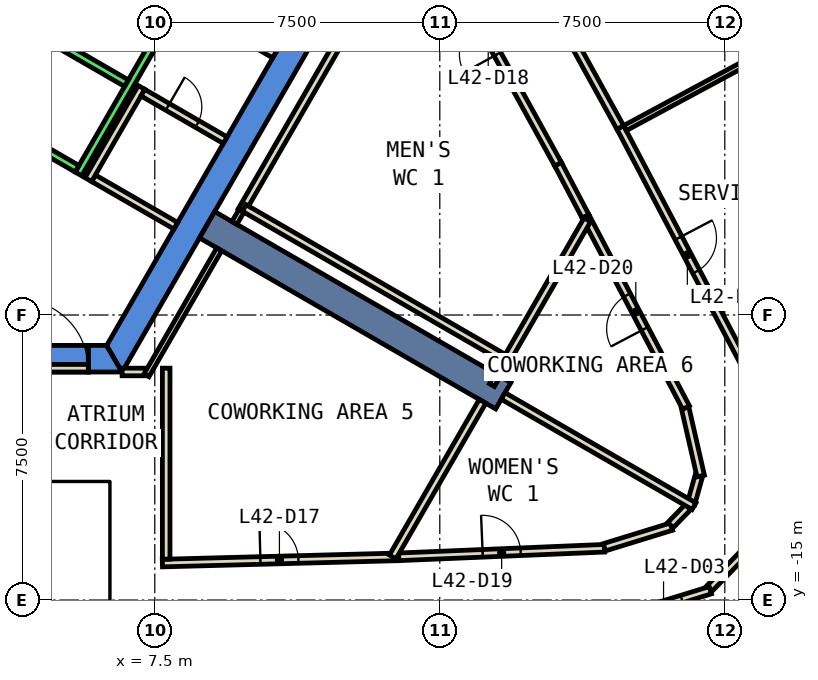
"""IFC4 building model, lengths in metres.
Left out: names, types, materials, properties, quantities, classifications, styles, units other than length and angle.
Written with IfcOpenShell. Run it as: python <this file> out.ifc"""

import sys

from ifc_helpers import new_model, si_unit, direction, frame, frame_2d, origin, place, context, subcontext, project, spatial, polyline, rectangle, outline, extrude, element, fill, save


model = new_model("IFC4")
c1 = context("Model", 3, precision=1e-05, world=origin(), true_north=direction((0.0, 1.0)))
c2 = subcontext(c1, "Body", "Model", "MODEL_VIEW")
j1 = project(units=[si_unit("LENGTHUNIT", "METRE"), si_unit("PLANEANGLEUNIT", "RADIAN")], contexts=[c1])
p1 = place(None, origin())
s1 = spatial("IfcSite", under=j1, at=p1, CompositionType="ELEMENT")
p2 = place(p1, origin())
s2 = spatial("IfcBuilding", under=s1, at=p2, CompositionType="ELEMENT")
p3 = place(p2, frame((0.0, 0.0, 189.8)))
s3 = spatial("IfcBuildingStorey", under=s2, at=p3, CompositionType="ELEMENT", Elevation=189.8)
p4 = place(p3, frame((0.0, 0.0, -0.6)))
e1 = element("IfcWall", 1, at=p4, inside=s3, PredefinedType="SHEAR", context=c2, shape_type="SweptSolid", body=[
    extrude(outline(polyline([(5.75, -8.3), (5.75, -9.0), (6.64, -9.0), (6.235, -8.3), (5.75, -8.3)])), origin(), (0.0, 0.0, 1.0), 4.4),
])
p5 = place(p3, frame((0.0, 0.0, 3.6)))
e2 = element("IfcWall", 2, at=p5, inside=s3, PredefinedType="SHEAR", context=c2, shape_type="SweptSolid", body=[
    extrude(outline(polyline([(5.75, -9.0), (5.75, -8.3), (3.75, -8.3), (3.75, -9.0), (5.75, -9.0)])), origin(), (0.0, 0.0, 1.0), 0.2),
])
p6 = place(p3, frame((0.0, 0.0, -0.6)))
e3 = element("IfcWall", 3, at=p6, inside=s3, PredefinedType="SHEAR", context=c2, shape_type="SweptSolid", body=[
    extrude(outline(polyline([(6.64, -9.0), (13.279, 2.5), (12.471, 2.5), (6.235, -8.3), (6.64, -9.0)])), origin(), (0.0, 0.0, 1.0), 4.4),
])
p7 = place(p3, frame((8.877, -5.125, -0.6), z_axis=(0.0, 0.0, 1.0), x_axis=(0.866017533419, -0.500013631625, 0.0)))
e4 = element("IfcWall", 4, at=p7, inside=s3, PredefinedType="SHEAR", context=c2, shape_type="SweptSolid", body=[
    extrude(rectangle(XDim=9.0, YDim=0.8, at=frame_2d((4.5, 0.0))), origin(), (0.0, 0.0, 1.0), 4.4),
])
p8 = place(p3, frame((7.7, -14.027, 0.0), z_axis=(0.0, 0.0, 1.0), x_axis=(0.999653919353, 0.026306682088, 0.0)))
e5 = element("IfcWall", 5, at=p8, inside=s3, PredefinedType="PARTITIONING", context=c2, shape_type="SweptSolid", body=[
    extrude(rectangle(XDim=6.162, YDim=0.2, at=frame_2d((3.081, 0.0))), origin(), (0.0, 0.0, 1.0), 3.8),
])
p9 = place(p8, frame((2.581, 0.0, 0.0)))
e6 = element("IfcOpeningElement", 6, at=p9, cuts=e5, PredefinedType="OPENING", context=c2, shape_type="SweptSolid", body=[
    extrude(rectangle(XDim=1.0, YDim=2.1, at=frame_2d((0.5, 1.05))), frame((0.0, 0.11, 0.0), z_axis=(0.0, -1.0, 0.0), x_axis=(1.0, 0.0, 0.0)), (0.0, 0.0, 1.0), 0.22),
])
p10 = place(p3, frame((18.836, -4.906, 0.0), z_axis=(0.0, 0.0, 1.0), x_axis=(-0.465843561357, 0.884867095299, 0.0)))
e7 = element("IfcWall", 7, at=p10, inside=s3, PredefinedType="PARTITIONING", context=c2, shape_type="SweptSolid", body=[
    extrude(rectangle(XDim=1.554, YDim=0.2, at=frame_2d((0.777, 0.0))), origin(), (0.0, 0.0, 1.0), 3.8),
])
p11 = place(p3, frame((18.112, -3.531, 0.0), z_axis=(0.0, 0.0, 1.0), x_axis=(-0.482800061144, 0.875730609811, 0.0)))
e8 = element("IfcWall", 8, at=p11, inside=s3, PredefinedType="PARTITIONING", context=c2, shape_type="SweptSolid", body=[
    extrude(rectangle(XDim=7.612, YDim=0.2, at=frame_2d((3.806, 0.0))), origin(), (0.0, 0.0, 1.0), 3.8),
])
p12 = place(p11, frame((3.306, 0.0, 0.0)))
e9 = element("IfcOpeningElement", 9, at=p12, cuts=e8, PredefinedType="OPENING", context=c2, shape_type="SweptSolid", body=[
    extrude(rectangle(XDim=1.0, YDim=2.1, at=frame_2d((0.5, 1.05))), frame((0.0, 0.11, 0.0), z_axis=(0.0, -1.0, 0.0), x_axis=(1.0, 0.0, 0.0)), (0.0, 0.0, 1.0), 0.22),
])
p13 = place(p3, frame((13.919, -13.863, 0.0), z_axis=(0.0, 0.0, 1.0), x_axis=(0.999130261307, 0.041697972867, 0.0)))
e10 = element("IfcWall", 10, at=p13, inside=s3, PredefinedType="PARTITIONING", context=c2, shape_type="SweptSolid", body=[
    extrude(rectangle(XDim=5.422, YDim=0.2, at=frame_2d((2.711, 0.0))), origin(), (0.0, 0.0, 1.0), 3.8),
])
p14 = place(p13, frame((2.211, 0.0, 0.0)))
e11 = element("IfcOpeningElement", 11, at=p14, cuts=e10, PredefinedType="OPENING", context=c2, shape_type="SweptSolid", body=[
    extrude(rectangle(XDim=1.0, YDim=2.1, at=frame_2d((0.5, 1.05))), frame((0.0, 0.11, 0.0), z_axis=(0.0, -1.0, 0.0), x_axis=(1.0, 0.0, 0.0)), (0.0, 0.0, 1.0), 0.22),
])
p15 = place(p3, frame((19.332, -13.611, 0.0), z_axis=(0.0, 0.0, 1.0), x_axis=(0.955790442908, 0.294048685161, 0.0)))
e12 = element("IfcWall", 12, at=p15, inside=s3, PredefinedType="PARTITIONING", context=c2, shape_type="SweptSolid", body=[
    extrude(rectangle(XDim=1.846, YDim=0.2, at=frame_2d((0.923, 0.0))), origin(), (0.0, 0.0, 1.0), 3.8),
])
p16 = place(p3, frame((21.072, -13.026, 0.0), z_axis=(0.0, 0.0, 1.0), x_axis=(0.697252405765, 0.716825698936, 0.0)))
e13 = element("IfcWall", 13, at=p16, inside=s3, PredefinedType="PARTITIONING", context=c2, shape_type="SweptSolid", body=[
    extrude(rectangle(XDim=0.661, YDim=0.2, at=frame_2d((0.331, 0.0))), origin(), (0.0, 0.0, 1.0), 3.8),
])
p17 = place(p3, frame((21.608, -12.476, 0.0), z_axis=(0.0, 0.0, 1.0), x_axis=(0.270277025631, 0.962782597171, 0.0)))
e14 = element("IfcWall", 14, at=p17, inside=s3, PredefinedType="PARTITIONING", context=c2, shape_type="SweptSolid", body=[
    extrude(rectangle(XDim=0.77, YDim=0.2, at=frame_2d((0.385, 0.0))), origin(), (0.0, 0.0, 1.0), 3.8),
])
p18 = place(p3, frame((21.866, -11.737, 0.0), z_axis=(0.0, 0.0, 1.0), x_axis=(-0.222871656966, 0.974847795567, 0.0)))
e15 = element("IfcWall", 15, at=p18, inside=s3, PredefinedType="PARTITIONING", context=c2, shape_type="SweptSolid", body=[
    extrude(rectangle(XDim=1.839, YDim=0.2, at=frame_2d((0.919, 0.0))), origin(), (0.0, 0.0, 1.0), 3.8),
])
p19 = place(p3, frame((21.48, -9.935, 0.0), z_axis=(0.0, 0.0, 1.0), x_axis=(-0.465356775138, 0.885123195851, 0.0)))
e16 = element("IfcWall", 16, at=p19, inside=s3, PredefinedType="PARTITIONING", context=c2, shape_type="SweptSolid", body=[
    extrude(rectangle(XDim=5.682, YDim=0.2, at=frame_2d((2.841, 0.0))), origin(), (0.0, 0.0, 1.0), 3.8),
])
p20 = place(p19, frame((2.341, 0.0, 0.0)))
e17 = element("IfcOpeningElement", 17, at=p20, cuts=e16, PredefinedType="OPENING", context=c2, shape_type="SweptSolid", body=[
    extrude(rectangle(XDim=1.0, YDim=2.1, at=frame_2d((0.5, 1.05))), frame((0.0, 0.11, 0.0), z_axis=(0.0, -1.0, 0.0), x_axis=(1.0, 0.0, 0.0)), (0.0, 0.0, 1.0), 0.22),
])
p21 = place(p3, frame((23.236, -13.528, 0.0), z_axis=(0.0, 0.0, 1.0), x_axis=(-0.698551276451, -0.715560000397, 0.0)))
e18 = element("IfcWall", 18, at=p21, inside=s3, PredefinedType="PARTITIONING", context=c2, shape_type="SweptSolid", body=[
    extrude(rectangle(XDim=1.636, YDim=0.2, at=frame_2d((0.818, 0.0))), origin(), (0.0, 0.0, 1.0), 3.8),
])
p22 = place(p3, frame((22.119, -14.741, 0.0), z_axis=(0.0, 0.0, 1.0), x_axis=(-0.955612889251, -0.294625195625, 0.0)))
e19 = element("IfcWall", 19, at=p22, inside=s3, PredefinedType="PARTITIONING", context=c2, shape_type="SweptSolid", body=[
    extrude(rectangle(XDim=2.576, YDim=0.2, at=frame_2d((1.288, 0.0))), origin(), (0.0, 0.0, 1.0), 3.8),
])
p23 = place(p22, frame((0.788, 0.0, 0.0)))
e20 = element("IfcOpeningElement", 20, at=p23, cuts=e19, PredefinedType="OPENING", context=c2, shape_type="SweptSolid", body=[
    extrude(rectangle(XDim=1.0, YDim=2.1, at=frame_2d((0.5, 1.05))), frame((0.0, 0.11, 0.0), z_axis=(0.0, -1.0, 0.0), x_axis=(1.0, 0.0, 0.0)), (0.0, 0.0, 1.0), 0.22),
])
p24 = place(p3, frame((19.75, -2.563, 0.0), z_axis=(0.0, 0.0, 1.0), x_axis=(0.465444987791, -0.885076812113, 0.0)))
e21 = element("IfcWall", 21, at=p24, inside=s3, PredefinedType="PARTITIONING", context=c2, shape_type="SweptSolid", body=[
    extrude(rectangle(XDim=7.578, YDim=0.2, at=frame_2d((3.789, 0.0))), origin(), (0.0, 0.0, 1.0), 3.8),
])
p25 = place(p24, frame((3.289, 0.0, 0.0)))
e22 = element("IfcOpeningElement", 22, at=p25, cuts=e21, PredefinedType="OPENING", context=c2, shape_type="SweptSolid", body=[
    extrude(rectangle(XDim=1.0, YDim=2.1, at=frame_2d((0.5, 1.05))), frame((0.0, 0.11, 0.0), z_axis=(0.0, -1.0, 0.0), x_axis=(1.0, 0.0, 0.0)), (0.0, 0.0, 1.0), 0.22),
])
p26 = place(p3, frame((15.831, 4.542, 0.0), z_axis=(0.0, 0.0, 1.0), x_axis=(0.482835531749, -0.875711053533, 0.0)))
e23 = element("IfcWall", 23, at=p26, inside=s3, PredefinedType="PARTITIONING", context=c2, shape_type="SweptSolid", body=[
    extrude(rectangle(XDim=8.115, YDim=0.2, at=frame_2d((4.057, 0.0))), origin(), (0.0, 0.0, 1.0), 3.8),
])
p27 = place(p26, frame((3.632, 0.0, 0.0)))
e24 = element("IfcOpeningElement", 24, at=p27, cuts=e23, PredefinedType="OPENING", context=c2, shape_type="SweptSolid", body=[
    extrude(rectangle(XDim=1.0, YDim=2.1, at=frame_2d((0.5, 1.05))), frame((0.0, 0.11, 0.0), z_axis=(0.0, -1.0, 0.0), x_axis=(1.0, 0.0, 0.0)), (0.0, 0.0, 1.0), 0.22),
])
p28 = place(p3, frame((8.053, -5.152, 0.0), z_axis=(0.0, 0.0, 1.0), x_axis=(-0.866022959057, 0.500004234368, 0.0)))
e25 = element("IfcWall", 25, at=p28, inside=s3, PredefinedType="PARTITIONING", context=c2, shape_type="SweptSolid", body=[
    extrude(rectangle(XDim=2.5, YDim=0.2, at=frame_2d((1.25, 0.0))), origin(), (0.0, 0.0, 1.0), 3.8),
])
p29 = place(p3, frame((5.751, -3.938, 0.0), z_axis=(0.0, 0.0, 1.0), x_axis=(0.49994636267, 0.866056369097, 0.0)))
e26 = element("IfcWall", 26, at=p29, inside=s3, PredefinedType="PARTITIONING", context=c2, shape_type="SweptSolid", body=[
    extrude(rectangle(XDim=2.8, YDim=0.2, at=frame_2d((1.4, 0.0))), origin(), (0.0, 0.0, 1.0), 3.8),
])
p30 = place(p3, frame((7.188, -1.65, 0.0), z_axis=(0.0, 0.0, 1.0), x_axis=(0.866022959057, -0.500004234368, 0.0)))
e27 = element("IfcWall", 27, at=p30, inside=s3, PredefinedType="PARTITIONING", context=c2, shape_type="SweptSolid", body=[
    extrude(rectangle(XDim=2.5, YDim=0.2, at=frame_2d((1.25, 0.0))), origin(), (0.0, 0.0, 1.0), 3.8),
])
p31 = place(p30, frame((0.75, 0.0, 0.0)))
e28 = element("IfcOpeningElement", 28, at=p31, cuts=e27, PredefinedType="OPENING", context=c2, shape_type="SweptSolid", body=[
    extrude(rectangle(XDim=0.9, YDim=2.1, at=frame_2d((0.45, 1.05))), frame((0.0, 0.11, 0.0), z_axis=(0.0, -1.0, 0.0), x_axis=(1.0, 0.0, 0.0)), (0.0, 0.0, 1.0), 0.22),
])
p32 = place(p3, frame((10.653, -0.648, 0.0), z_axis=(0.0, 0.0, 1.0), x_axis=(-0.866036505625, 0.499980770555, 0.0)))
e29 = element("IfcWall", 29, at=p32, inside=s3, PredefinedType="PARTITIONING", context=c2, shape_type="SweptSolid", body=[
    extrude(rectangle(XDim=2.7, YDim=0.2, at=frame_2d((1.35, 0.0))), origin(), (0.0, 0.0, 1.0), 3.8),
])
p33 = place(p3, frame((6.641, -8.999, 0.0), z_axis=(0.0, 0.0, 1.0), x_axis=(1.0, 0.0, 0.0)))
e30 = element("IfcWall", 30, at=p33, inside=s3, PredefinedType="PARTITIONING", context=c2, shape_type="SweptSolid", body=[
    extrude(rectangle(XDim=0.617, YDim=0.2, at=frame_2d((0.309, 0.0))), origin(), (0.0, 0.0, 1.0), 3.8),
])
p34 = place(p3, frame((7.283, -9.086, 0.0), z_axis=(0.0, 0.0, 1.0), x_axis=(0.499843936326, 0.866115488442, 0.0)))
e31 = element("IfcWall", 31, at=p34, inside=s3, PredefinedType="PARTITIONING", context=c2, shape_type="SweptSolid", body=[
    extrude(rectangle(XDim=3.827, YDim=0.15, at=frame_2d((1.914, 0.0))), origin(), (0.0, 0.0, 1.0), 3.8),
])
p35 = place(p3, frame((9.781, -4.758, 0.0), z_axis=(0.0, 0.0, 1.0), x_axis=(0.50003174578, 0.866007074574, 0.0)))
e32 = element("IfcWall", 32, at=p35, inside=s3, PredefinedType="PARTITIONING", context=c2, shape_type="SweptSolid", body=[
    extrude(rectangle(XDim=9.315, YDim=0.2, at=frame_2d((4.658, 0.0))), origin(), (0.0, 0.0, 1.0), 3.8),
])
p36 = place(p3, frame((7.8, -8.899, 0.0), z_axis=(0.0, 0.0, 1.0), x_axis=(0.0, -1.0, 0.0)))
e33 = element("IfcWall", 33, at=p36, inside=s3, PredefinedType="PARTITIONING", context=c2, shape_type="SweptSolid", body=[
    extrude(rectangle(XDim=5.025, YDim=0.2, at=frame_2d((2.513, 0.0))), origin(), (0.0, 0.0, 1.0), 3.8),
])
p37 = place(p3, frame((9.853, -4.684, 0.0), z_axis=(0.0, 0.0, 1.0), x_axis=(0.865999791918, -0.500044358431, 0.0)))
e34 = element("IfcWall", 34, at=p37, inside=s3, PredefinedType="PARTITIONING", context=c2, shape_type="SweptSolid", body=[
    extrude(rectangle(XDim=8.075, YDim=0.2, at=frame_2d((4.038, 0.0))), origin(), (0.0, 0.0, 1.0), 3.8),
])
p38 = place(p3, frame((16.125, -9.771, 0.0), z_axis=(0.0, 0.0, 1.0), x_axis=(-0.500030759312, -0.866007644159, 0.0)))
e35 = element("IfcWall", 35, at=p38, inside=s3, PredefinedType="PARTITIONING", context=c2, shape_type="SweptSolid", body=[
    extrude(rectangle(XDim=4.73, YDim=0.2, at=frame_2d((2.365, 0.0))), origin(), (0.0, 0.0, 1.0), 3.8),
])
p39 = place(p3, frame((16.71, -8.758, 0.0), z_axis=(0.0, 0.0, 1.0), x_axis=(-0.500013496215, -0.866017611601, 0.0)))
e36 = element("IfcWall", 36, at=p39, inside=s3, PredefinedType="PARTITIONING", context=c2, shape_type="SweptSolid", body=[
    extrude(rectangle(XDim=0.678, YDim=0.15, at=frame_2d((0.339, 0.0))), origin(), (0.0, 0.0, 1.0), 3.8),
])
p40 = place(p3, frame((18.882, -4.995, 0.0), z_axis=(0.0, 0.0, 1.0), x_axis=(-0.499895813511, -0.866085547527, 0.0)))
e37 = element("IfcWall", 37, at=p40, inside=s3, PredefinedType="PARTITIONING", context=c2, shape_type="SweptSolid", body=[
    extrude(rectangle(XDim=4.145, YDim=0.2, at=frame_2d((2.073, 0.0))), origin(), (0.0, 0.0, 1.0), 3.8),
])
p41 = place(p3, frame((16.667, -9.631, 0.0), z_axis=(0.0, 0.0, 1.0), x_axis=(0.866032775405, -0.499987231761, 0.0)))
e38 = element("IfcWall", 38, at=p41, inside=s3, PredefinedType="PARTITIONING", context=c2, shape_type="SweptSolid", body=[
    extrude(rectangle(XDim=5.8, YDim=0.2, at=frame_2d((2.9, 0.0))), origin(), (0.0, 0.0, 1.0), 3.8),
])
p42 = place(p3, frame((19.873, -2.582, 0.0), z_axis=(0.0, 0.0, 1.0), x_axis=(0.880480475723, 0.474082410421, 0.0)))
e39 = element("IfcWall", 39, at=p42, inside=s3, PredefinedType="PARTITIONING", context=c2, shape_type="SweptSolid", body=[
    extrude(rectangle(XDim=4.181, YDim=0.15, at=frame_2d((2.09, 0.0))), origin(), (0.0, 0.0, 1.0), 3.8),
])
p43 = place(p3, frame((3.75, -8.9, 0.0), z_axis=(0.0, 0.0, 1.0), x_axis=(1.0, 0.0, 0.0)))
e40 = element("IfcWall", 40, at=p43, inside=s3, PredefinedType="PARTITIONING", context=c2, shape_type="SweptSolid", body=[
    extrude(rectangle(XDim=2.0, YDim=0.2, at=frame_2d((1.0, 0.0))), origin(), (0.0, 0.0, 1.0), 2.4),
])
p44 = place(p43, frame((0.19, 0.0, 0.0)))
e41 = element("IfcOpeningElement", 41, at=p44, cuts=e40, PredefinedType="OPENING", context=c2, shape_type="SweptSolid", body=[
    extrude(rectangle(XDim=1.8, YDim=2.1, at=frame_2d((0.9, 1.05))), frame((0.0, 0.11, 0.0), z_axis=(0.0, -1.0, 0.0), x_axis=(1.0, 0.0, 0.0)), (0.0, 0.0, 1.0), 0.22),
])
p45 = place(p3, frame((9.596, -5.078, 0.0), z_axis=(0.0, 0.0, 1.0), x_axis=(0.500827895298, 0.86554689029, 0.0)))
e42 = element("IfcWall", 42, at=p45, inside=s3, PredefinedType="PARTITIONING", context=c2, shape_type="SweptSolid", body=[
    extrude(rectangle(XDim=0.369, YDim=0.15, at=frame_2d((0.185, 0.0))), origin(), (0.0, 0.0, 1.0), 3.8),
])
p46 = place(p3, frame((3.24, -2.488, 0.0), z_axis=(0.0, 0.0, 1.0), x_axis=(0.500034260056, 0.866005622828, 0.0)))
e43 = element("IfcWall", 43, at=p46, inside=s3, PredefinedType="STANDARD", context=c2, shape_type="SweptSolid", body=[
    extrude(rectangle(XDim=5.399, YDim=0.2, at=frame_2d((2.7, 0.0))), origin(), (0.0, 0.0, 1.0), 3.8),
])
p47 = place(p46, frame((3.225, 0.0, 0.0)))
e44 = element("IfcOpeningElement", 44, at=p47, cuts=e43, PredefinedType="OPENING", context=c2, shape_type="SweptSolid", body=[
    extrude(rectangle(XDim=1.1, YDim=2.1, at=frame_2d((0.55, 1.05))), frame((0.0, 0.11, 0.0), z_axis=(0.0, -1.0, 0.0), x_axis=(1.0, 0.0, 0.0)), (0.0, 0.0, 1.0), 0.22),
])
p48 = place(p46, frame((1.225, 0.0, 0.0)))
e45 = element("IfcOpeningElement", 45, at=p48, cuts=e43, PredefinedType="OPENING", context=c2, shape_type="SweptSolid", body=[
    extrude(rectangle(XDim=1.1, YDim=2.1, at=frame_2d((0.55, 1.05))), frame((0.0, 0.11, 0.0), z_axis=(0.0, -1.0, 0.0), x_axis=(1.0, 0.0, 0.0)), (0.0, 0.0, 1.0), 0.22),
])
p49 = place(p3, frame((5.492, -3.788, 0.0), z_axis=(0.0, 0.0, 1.0), x_axis=(0.500034260056, 0.866005622828, 0.0)))
e46 = element("IfcWall", 46, at=p49, inside=s3, PredefinedType="STANDARD", context=c2, shape_type="SweptSolid", body=[
    extrude(rectangle(XDim=5.399, YDim=0.2, at=frame_2d((2.7, 0.0))), origin(), (0.0, 0.0, 1.0), 3.8),
])
p50 = place(p3, frame((3.377, -2.452, 0.0), z_axis=(0.0, 0.0, 1.0), x_axis=(0.865955154139, -0.50012165622, 0.0)))
e47 = element("IfcWall", 47, at=p50, inside=s3, PredefinedType="STANDARD", context=c2, shape_type="SweptSolid", body=[
    extrude(rectangle(XDim=2.4, YDim=0.2, at=frame_2d((1.2, 0.0))), origin(), (0.0, 0.0, 1.0), 3.8),
])
p51 = place(p3, frame((4.677, -0.2, 0.0), z_axis=(0.0, 0.0, 1.0), x_axis=(0.865973769406, -0.500089422704, 0.0)))
e48 = element("IfcWall", 48, at=p51, inside=s3, PredefinedType="STANDARD", context=c2, shape_type="SweptSolid", body=[
    extrude(rectangle(XDim=2.399, YDim=0.2, at=frame_2d((1.2, 0.0))), origin(), (0.0, 0.0, 1.0), 3.8),
])
p52 = place(p23, origin())
e49 = element("IfcDoor", 49, at=p52, inside=s3, OperationType="SINGLE_SWING_LEFT", PredefinedType="DOOR", context=c2, shape_type="SweptSolid", body=[
    extrude(rectangle(XDim=1.0, YDim=2.1, at=frame_2d((0.5, 1.05))), frame((0.0, 0.025, 0.0), z_axis=(0.0, -1.0, 0.0), x_axis=(1.0, 0.0, 0.0)), (0.0, 0.0, 1.0), 0.05),
])
fill(e20, e49)
p53 = place(p25, origin())
e50 = element("IfcDoor", 50, at=p53, inside=s3, OperationType="SINGLE_SWING_LEFT", PredefinedType="DOOR", context=c2, shape_type="SweptSolid", body=[
    extrude(rectangle(XDim=1.0, YDim=2.1, at=frame_2d((0.5, 1.05))), frame((0.0, 0.025, 0.0), z_axis=(0.0, -1.0, 0.0), x_axis=(1.0, 0.0, 0.0)), (0.0, 0.0, 1.0), 0.05),
])
fill(e22, e50)
p54 = place(p9, origin())
e51 = element("IfcDoor", 51, at=p54, inside=s3, OperationType="SINGLE_SWING_LEFT", PredefinedType="DOOR", context=c2, shape_type="SweptSolid", body=[
    extrude(rectangle(XDim=1.0, YDim=2.1, at=frame_2d((0.5, 1.05))), frame((0.0, 0.025, 0.0), z_axis=(0.0, -1.0, 0.0), x_axis=(1.0, 0.0, 0.0)), (0.0, 0.0, 1.0), 0.05),
])
fill(e6, e51)
p55 = place(p12, origin())
e52 = element("IfcDoor", 52, at=p55, inside=s3, OperationType="SINGLE_SWING_LEFT", PredefinedType="DOOR", context=c2, shape_type="SweptSolid", body=[
    extrude(rectangle(XDim=1.0, YDim=2.1, at=frame_2d((0.5, 1.05))), frame((0.0, 0.025, 0.0), z_axis=(0.0, -1.0, 0.0), x_axis=(1.0, 0.0, 0.0)), (0.0, 0.0, 1.0), 0.05),
])
fill(e9, e52)
p56 = place(p14, origin())
e53 = element("IfcDoor", 53, at=p56, inside=s3, OperationType="SINGLE_SWING_LEFT", PredefinedType="DOOR", context=c2, shape_type="SweptSolid", body=[
    extrude(rectangle(XDim=1.0, YDim=2.1, at=frame_2d((0.5, 1.05))), frame((0.0, 0.025, 0.0), z_axis=(0.0, -1.0, 0.0), x_axis=(1.0, 0.0, 0.0)), (0.0, 0.0, 1.0), 0.05),
])
fill(e11, e53)
p57 = place(p20, origin())
e54 = element("IfcDoor", 54, at=p57, inside=s3, OperationType="SINGLE_SWING_LEFT", PredefinedType="DOOR", context=c2, shape_type="SweptSolid", body=[
    extrude(rectangle(XDim=1.0, YDim=2.1, at=frame_2d((0.5, 1.05))), frame((0.0, 0.025, 0.0), z_axis=(0.0, -1.0, 0.0), x_axis=(1.0, 0.0, 0.0)), (0.0, 0.0, 1.0), 0.05),
])
fill(e17, e54)
p58 = place(p31, origin())
e55 = element("IfcDoor", 55, at=p58, inside=s3, OperationType="SINGLE_SWING_RIGHT", PredefinedType="DOOR", context=c2, shape_type="SweptSolid", body=[
    extrude(rectangle(XDim=0.9, YDim=2.1, at=frame_2d((0.45, 1.05))), frame((0.0, 0.025, 0.0), z_axis=(0.0, -1.0, 0.0), x_axis=(1.0, 0.0, 0.0)), (0.0, 0.0, 1.0), 0.05),
])
fill(e28, e55)
p59 = place(p44, origin())
e56 = element("IfcDoor", 56, at=p59, inside=s3, OperationType="DOUBLE_DOOR_SINGLE_SWING", PredefinedType="DOOR", context=c2, shape_type="SweptSolid", body=[
    extrude(rectangle(XDim=1.8, YDim=2.1, at=frame_2d((0.9, 1.05))), frame((0.0, 0.025, 0.0), z_axis=(0.0, -1.0, 0.0), x_axis=(1.0, 0.0, 0.0)), (0.0, 0.0, 1.0), 0.05),
])
fill(e41, e56)
save(model, sys.argv[1])
